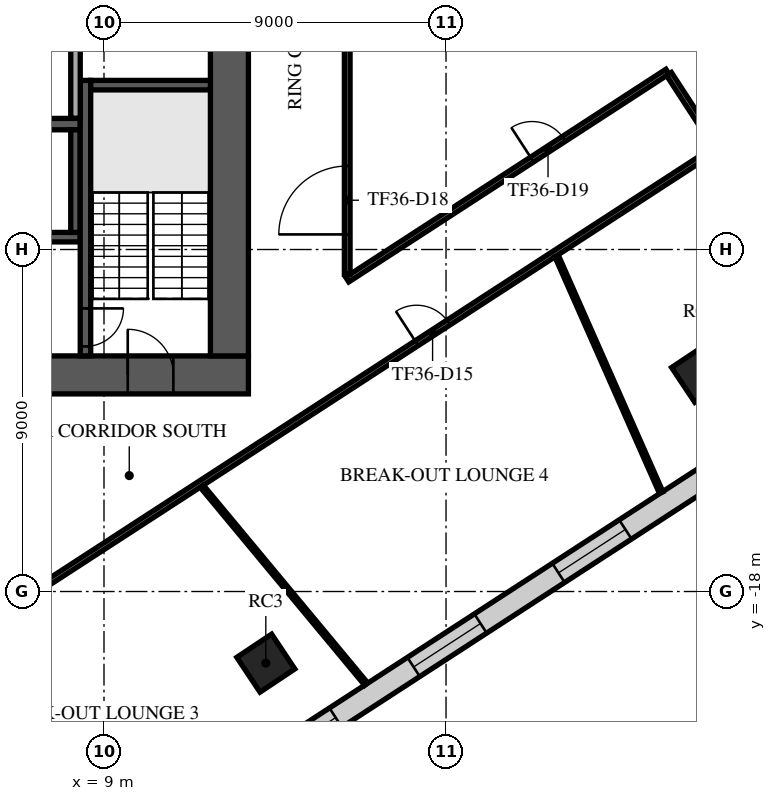
"""IFC4 building model, lengths in metres.
Left out: names, types, materials, properties, quantities, classifications, styles, units other than length and angle.
Written with IfcOpenShell. Run it as: python <this file> out.ifc"""

import sys

from ifc_helpers import new_model, si_unit, direction, frame, frame_2d, origin, origin_2d, place, context, subcontext, project, spatial, rectangle, extrude, element, fill, save


model = new_model("IFC4")
c1 = context("Model", 3, precision=1e-05, world=origin(), true_north=direction((0.0, 1.0)))
c2 = subcontext(c1, "Body", "Model", "MODEL_VIEW")
j1 = project(units=[si_unit("LENGTHUNIT", "METRE"), si_unit("PLANEANGLEUNIT", "RADIAN")], contexts=[c1])
p1 = place(None, origin())
s1 = spatial("IfcSite", under=j1, at=p1, CompositionType="ELEMENT")
p2 = place(p1, origin())
s2 = spatial("IfcBuilding", under=s1, at=p2, CompositionType="ELEMENT")
p3 = place(p2, frame((0.0, 0.0, 155.7)))
s3 = spatial("IfcBuildingStorey", under=s2, at=p3, CompositionType="ELEMENT", Elevation=155.7)
for number, where, z_axis, x_axis in (
    (1, (13.258, -19.885, 0.0), (0.0, 0.0, 1.0), (0.832, 0.555, 0.0)),
    (2, (24.699, -12.258, 0.0), (0.0, 0.0, 1.0), (0.832, 0.555, 0.0)),
):
    element("IfcColumn", number, at=place(p3, frame(where, z_axis=z_axis, x_axis=x_axis)), inside=s3, PredefinedType="COLUMN", context=c2, shape_type="SweptSolid", body=[
        extrude(rectangle(XDim=1.1, YDim=1.1, at=origin_2d()), origin(), (0.0, 0.0, 1.0), 4.0),
    ])
p4 = place(p3, frame((-12.8, -12.3, 0.0), z_axis=(0.0, 0.0, 1.0), x_axis=(1.0, 0.0, 0.0)))
e3 = element("IfcWall", 3, at=p4, inside=s3, PredefinedType="SHEAR", context=c2, shape_type="SweptSolid", body=[
    extrude(rectangle(XDim=25.6, YDim=1.0, at=frame_2d((12.8, 0.0))), origin(), (0.0, 0.0, 1.0), 3.6),
])
p5 = place(p4, frame((7.7, 0.0, 0.0)))
e4 = element("IfcOpeningElement", 4, at=p5, cuts=e3, PredefinedType="OPENING", context=c2, shape_type="SweptSolid", body=[
    extrude(rectangle(XDim=2.0, YDim=2.1, at=frame_2d((1.0, 1.05))), frame((0.0, 0.51, 0.0), z_axis=(0.0, -1.0, 0.0), x_axis=(1.0, 0.0, 0.0)), (0.0, 0.0, 1.0), 1.02),
])
p6 = place(p4, frame((17.825, 0.0, 0.0)))
e5 = element("IfcOpeningElement", 5, at=p6, cuts=e3, PredefinedType="OPENING", context=c2, shape_type="SweptSolid", body=[
    extrude(rectangle(XDim=1.2, YDim=2.1, at=frame_2d((0.6, 1.05))), frame((0.0, 0.51, 0.0), z_axis=(0.0, -1.0, 0.0), x_axis=(1.0, 0.0, 0.0)), (0.0, 0.0, 1.0), 1.02),
])
p7 = place(p4, frame((1.975, 0.0, 0.0)))
e6 = element("IfcOpeningElement", 6, at=p7, cuts=e3, PredefinedType="OPENING", context=c2, shape_type="SweptSolid", body=[
    extrude(rectangle(XDim=1.2, YDim=2.1, at=frame_2d((0.6, 1.05))), frame((0.0, 0.51, 0.0), z_axis=(0.0, -1.0, 0.0), x_axis=(1.0, 0.0, 0.0)), (0.0, 0.0, 1.0), 1.02),
])
p8 = place(p4, frame((22.425, 0.0, 0.0)))
e7 = element("IfcOpeningElement", 7, at=p8, cuts=e3, PredefinedType="OPENING", context=c2, shape_type="SweptSolid", body=[
    extrude(rectangle(XDim=1.2, YDim=2.1, at=frame_2d((0.6, 1.05))), frame((0.0, 0.51, 0.0), z_axis=(0.0, -1.0, 0.0), x_axis=(1.0, 0.0, 0.0)), (0.0, 0.0, 1.0), 1.02),
])
p9 = place(p3, frame((12.3, -11.8, 0.0), z_axis=(0.0, 0.0, 1.0), x_axis=(0.0, 1.0, 0.0)))
e8 = element("IfcWall", 8, at=p9, inside=s3, PredefinedType="SHEAR", context=c2, shape_type="SweptSolid", body=[
    extrude(rectangle(XDim=23.6, YDim=1.0, at=frame_2d((11.8, 0.0))), origin(), (0.0, 0.0, 1.0), 3.6),
])
p10 = place(p9, frame((10.6, 0.0, 0.0)))
e9 = element("IfcOpeningElement", 9, at=p10, cuts=e8, PredefinedType="OPENING", context=c2, shape_type="SweptSolid", body=[
    extrude(rectangle(XDim=2.4, YDim=2.4, at=frame_2d((1.2, 1.2))), frame((0.0, 0.51, 0.0), z_axis=(0.0, -1.0, 0.0), x_axis=(1.0, 0.0, 0.0)), (0.0, 0.0, 1.0), 1.02),
])
p11 = place(p3, frame((-2.875, -5.7, 0.0), z_axis=(0.0, 0.0, 1.0), x_axis=(1.0, 0.0, 0.0)))
e10 = element("IfcWall", 10, at=p11, inside=s3, PredefinedType="SOLIDWALL", context=c2, shape_type="SweptSolid", body=[
    extrude(rectangle(XDim=11.25, YDim=0.3, at=frame_2d((5.625, 0.0))), origin(), (0.0, 0.0, 1.0), 3.6),
])
p12 = place(p3, frame((-2.875, -8.675, 0.0), z_axis=(0.0, 0.0, 1.0), x_axis=(1.0, 0.0, 0.0)))
e11 = element("IfcWall", 11, at=p12, inside=s3, PredefinedType="SOLIDWALL", context=c2, shape_type="SweptSolid", body=[
    extrude(rectangle(XDim=11.25, YDim=0.25, at=frame_2d((5.625, 0.0))), origin(), (0.0, 0.0, 1.0), 3.6),
])
p13 = place(p12, frame((0.9, 0.0, 0.0)))
e12 = element("IfcOpeningElement", 12, at=p13, cuts=e11, PredefinedType="OPENING", context=c2, shape_type="SweptSolid", body=[
    extrude(rectangle(XDim=1.2, YDim=2.1, at=frame_2d((0.6, 1.05))), frame((0.0, 0.135, 0.0), z_axis=(0.0, -1.0, 0.0), x_axis=(1.0, 0.0, 0.0)), (0.0, 0.0, 1.0), 0.27),
])
p14 = place(p12, frame((3.65, 0.0, 0.0)))
e13 = element("IfcOpeningElement", 13, at=p14, cuts=e11, PredefinedType="OPENING", context=c2, shape_type="SweptSolid", body=[
    extrude(rectangle(XDim=1.2, YDim=2.1, at=frame_2d((0.6, 1.05))), frame((0.0, 0.135, 0.0), z_axis=(0.0, -1.0, 0.0), x_axis=(1.0, 0.0, 0.0)), (0.0, 0.0, 1.0), 0.27),
])
p15 = place(p12, frame((6.4, 0.0, 0.0)))
e14 = element("IfcOpeningElement", 14, at=p15, cuts=e11, PredefinedType="OPENING", context=c2, shape_type="SweptSolid", body=[
    extrude(rectangle(XDim=1.2, YDim=2.1, at=frame_2d((0.6, 1.05))), frame((0.0, 0.135, 0.0), z_axis=(0.0, -1.0, 0.0), x_axis=(1.0, 0.0, 0.0)), (0.0, 0.0, 1.0), 0.27),
])
p16 = place(p12, frame((9.15, 0.0, 0.0)))
e15 = element("IfcOpeningElement", 15, at=p16, cuts=e11, PredefinedType="OPENING", context=c2, shape_type="SweptSolid", body=[
    extrude(rectangle(XDim=1.2, YDim=2.1, at=frame_2d((0.6, 1.05))), frame((0.0, 0.135, 0.0), z_axis=(0.0, -1.0, 0.0), x_axis=(1.0, 0.0, 0.0)), (0.0, 0.0, 1.0), 0.27),
])
p17 = place(p3, frame((8.25, -8.55, 0.0), z_axis=(0.0, 0.0, 1.0), x_axis=(0.0, 1.0, 0.0)))
e16 = element("IfcWall", 16, at=p17, inside=s3, PredefinedType="SOLIDWALL", context=c2, shape_type="SweptSolid", body=[
    extrude(rectangle(XDim=2.7, YDim=0.25, at=frame_2d((1.35, 0.0))), origin(), (0.0, 0.0, 1.0), 3.6),
])
p18 = place(p3, frame((8.512, -4.55, 0.0), z_axis=(0.0, 0.0, 1.0), x_axis=(0.0, -1.0, 0.0)))
e17 = element("IfcWall", 17, at=p18, inside=s3, PredefinedType="SOLIDWALL", context=c2, shape_type="SweptSolid", body=[
    extrude(rectangle(XDim=7.25, YDim=0.275, at=frame_2d((3.625, 0.0))), origin(), (0.0, 0.0, 1.0), 3.6),
])
p19 = place(p18, frame((6.0, 0.0, 0.0)))
e18 = element("IfcOpeningElement", 18, at=p19, cuts=e17, PredefinedType="OPENING", context=c2, shape_type="SweptSolid", body=[
    extrude(rectangle(XDim=1.0, YDim=2.1, at=frame_2d((0.5, 1.05))), frame((0.0, 0.147, 0.0), z_axis=(0.0, -1.0, 0.0), x_axis=(1.0, 0.0, 0.0)), (0.0, 0.0, 1.0), 0.295),
])
p20 = place(p3, frame((8.65, -4.675, 0.0), z_axis=(0.0, 0.0, 1.0), x_axis=(1.0, 0.0, 0.0)))
e19 = element("IfcWall", 19, at=p20, inside=s3, PredefinedType="SOLIDWALL", context=c2, shape_type="SweptSolid", body=[
    extrude(rectangle(XDim=3.15, YDim=0.25, at=frame_2d((1.575, 0.0))), origin(), (0.0, 0.0, 1.0), 3.6),
])
p21 = place(p3, frame((8.25, -5.545, 0.0), z_axis=(0.0, 0.0, 1.0), x_axis=(0.0, 1.0, 0.0)))
e20 = element("IfcWall", 20, at=p21, inside=s3, PredefinedType="PARTITIONING", context=c2, shape_type="SweptSolid", body=[
    extrude(rectangle(XDim=2.69, YDim=0.25, at=frame_2d((1.345, 0.0))), origin(), (0.0, 0.0, 1.0), 3.6),
])
p22 = place(p3, frame((-6.647, -35.438, 0.0), z_axis=(0.0, 0.0, 1.0), x_axis=(0.838672034147, 0.544636777257, 0.0)))
e21 = element("IfcWall", 21, at=p22, inside=s3, PredefinedType="STANDARD", context=c2, shape_type="SweptSolid", body=[
    extrude(rectangle(XDim=49.751, YDim=0.6, at=frame_2d((24.876, 0.0))), origin(), (0.0, 0.0, 1.0), 3.6),
])
p23 = place(p22, frame((1.161, 0.0, 0.9)))
e22 = element("IfcOpeningElement", 22, at=p23, cuts=e21, PredefinedType="OPENING", context=c2, shape_type="SweptSolid", body=[
    extrude(rectangle(XDim=2.1, YDim=2.1, at=frame_2d((1.05, 1.05))), frame((0.0, 0.31, 0.0), z_axis=(0.0, -1.0, 0.0), x_axis=(1.0, 0.0, 0.0)), (0.0, 0.0, 1.0), 0.62),
])
p24 = place(p22, frame((5.644, 0.0, 0.9)))
e23 = element("IfcOpeningElement", 23, at=p24, cuts=e21, PredefinedType="OPENING", context=c2, shape_type="SweptSolid", body=[
    extrude(rectangle(XDim=2.1, YDim=2.1, at=frame_2d((1.05, 1.05))), frame((0.0, 0.31, 0.0), z_axis=(0.0, -1.0, 0.0), x_axis=(1.0, 0.0, 0.0)), (0.0, 0.0, 1.0), 0.62),
])
p25 = place(p22, frame((10.189, 0.0, 0.9)))
e24 = element("IfcOpeningElement", 24, at=p25, cuts=e21, PredefinedType="OPENING", context=c2, shape_type="SweptSolid", body=[
    extrude(rectangle(XDim=2.1, YDim=2.1, at=frame_2d((1.05, 1.05))), frame((0.0, 0.31, 0.0), z_axis=(0.0, -1.0, 0.0), x_axis=(1.0, 0.0, 0.0)), (0.0, 0.0, 1.0), 0.62),
])
p26 = place(p22, frame((14.735, 0.0, 0.9)))
e25 = element("IfcOpeningElement", 25, at=p26, cuts=e21, PredefinedType="OPENING", context=c2, shape_type="SweptSolid", body=[
    extrude(rectangle(XDim=2.1, YDim=2.1, at=frame_2d((1.05, 1.05))), frame((0.0, 0.31, 0.0), z_axis=(0.0, -1.0, 0.0), x_axis=(1.0, 0.0, 0.0)), (0.0, 0.0, 1.0), 0.62),
])
p27 = place(p22, frame((19.28, 0.0, 0.9)))
e26 = element("IfcOpeningElement", 26, at=p27, cuts=e21, PredefinedType="OPENING", context=c2, shape_type="SweptSolid", body=[
    extrude(rectangle(XDim=2.1, YDim=2.1, at=frame_2d((1.05, 1.05))), frame((0.0, 0.31, 0.0), z_axis=(0.0, -1.0, 0.0), x_axis=(1.0, 0.0, 0.0)), (0.0, 0.0, 1.0), 0.62),
])
p28 = place(p22, frame((23.826, 0.0, 0.9)))
e27 = element("IfcOpeningElement", 27, at=p28, cuts=e21, PredefinedType="OPENING", context=c2, shape_type="SweptSolid", body=[
    extrude(rectangle(XDim=2.1, YDim=2.1, at=frame_2d((1.05, 1.05))), frame((0.0, 0.31, 0.0), z_axis=(0.0, -1.0, 0.0), x_axis=(1.0, 0.0, 0.0)), (0.0, 0.0, 1.0), 0.62),
])
p29 = place(p22, frame((28.371, 0.0, 0.9)))
e28 = element("IfcOpeningElement", 28, at=p29, cuts=e21, PredefinedType="OPENING", context=c2, shape_type="SweptSolid", body=[
    extrude(rectangle(XDim=2.1, YDim=2.1, at=frame_2d((1.05, 1.05))), frame((0.0, 0.31, 0.0), z_axis=(0.0, -1.0, 0.0), x_axis=(1.0, 0.0, 0.0)), (0.0, 0.0, 1.0), 0.62),
])
p30 = place(p22, frame((32.917, 0.0, 0.9)))
e29 = element("IfcOpeningElement", 29, at=p30, cuts=e21, PredefinedType="OPENING", context=c2, shape_type="SweptSolid", body=[
    extrude(rectangle(XDim=2.1, YDim=2.1, at=frame_2d((1.05, 1.05))), frame((0.0, 0.31, 0.0), z_axis=(0.0, -1.0, 0.0), x_axis=(1.0, 0.0, 0.0)), (0.0, 0.0, 1.0), 0.62),
])
p31 = place(p22, frame((37.462, 0.0, 0.9)))
e30 = element("IfcOpeningElement", 30, at=p31, cuts=e21, PredefinedType="OPENING", context=c2, shape_type="SweptSolid", body=[
    extrude(rectangle(XDim=2.1, YDim=2.1, at=frame_2d((1.05, 1.05))), frame((0.0, 0.31, 0.0), z_axis=(0.0, -1.0, 0.0), x_axis=(1.0, 0.0, 0.0)), (0.0, 0.0, 1.0), 0.62),
])
p32 = place(p22, frame((42.008, 0.0, 0.9)))
e31 = element("IfcOpeningElement", 31, at=p32, cuts=e21, PredefinedType="OPENING", context=c2, shape_type="SweptSolid", body=[
    extrude(rectangle(XDim=2.1, YDim=2.1, at=frame_2d((1.05, 1.05))), frame((0.0, 0.31, 0.0), z_axis=(0.0, -1.0, 0.0), x_axis=(1.0, 0.0, 0.0)), (0.0, 0.0, 1.0), 0.62),
])
p33 = place(p22, frame((46.491, 0.0, 0.9)))
e32 = element("IfcOpeningElement", 32, at=p33, cuts=e21, PredefinedType="OPENING", context=c2, shape_type="SweptSolid", body=[
    extrude(rectangle(XDim=2.1, YDim=2.1, at=frame_2d((1.05, 1.05))), frame((0.0, 0.31, 0.0), z_axis=(0.0, -1.0, 0.0), x_axis=(1.0, 0.0, 0.0)), (0.0, 0.0, 1.0), 0.62),
])
p34 = place(p3, frame((-4.376, -25.496, 0.0), z_axis=(0.0, 0.0, 1.0), x_axis=(0.838659454634, 0.544656147631, 0.0)))
e33 = element("IfcWall", 33, at=p34, inside=s3, PredefinedType="PARTITIONING", context=c2, shape_type="SweptSolid", body=[
    extrude(rectangle(XDim=35.188, YDim=0.15, at=frame_2d((17.594, 0.0))), origin(), (0.0, 0.0, 1.0), 3.15),
])
p35 = place(p34, frame((2.55, 0.0, 0.0)))
e34 = element("IfcOpeningElement", 34, at=p35, cuts=e33, PredefinedType="OPENING", context=c2, shape_type="SweptSolid", body=[
    extrude(rectangle(XDim=1.0, YDim=2.1, at=frame_2d((0.5, 1.05))), frame((0.0, 0.085, 0.0), z_axis=(0.0, -1.0, 0.0), x_axis=(1.0, 0.0, 0.0)), (0.0, 0.0, 1.0), 0.17),
])
p36 = place(p34, frame((12.126, 0.0, 0.0)))
e35 = element("IfcOpeningElement", 35, at=p36, cuts=e33, PredefinedType="OPENING", context=c2, shape_type="SweptSolid", body=[
    extrude(rectangle(XDim=1.0, YDim=2.1, at=frame_2d((0.5, 1.05))), frame((0.0, 0.085, 0.0), z_axis=(0.0, -1.0, 0.0), x_axis=(1.0, 0.0, 0.0)), (0.0, 0.0, 1.0), 0.17),
])
p37 = place(p34, frame((25.759, 0.0, 0.0)))
e36 = element("IfcOpeningElement", 36, at=p37, cuts=e33, PredefinedType="OPENING", context=c2, shape_type="SweptSolid", body=[
    extrude(rectangle(XDim=1.0, YDim=2.1, at=frame_2d((0.5, 1.05))), frame((0.0, 0.085, 0.0), z_axis=(0.0, -1.0, 0.0), x_axis=(1.0, 0.0, 0.0)), (0.0, 0.0, 1.0), 0.17),
])
p38 = place(p3, frame((15.4, -9.791, 0.0), z_axis=(0.0, 0.0, 1.0), x_axis=(0.838699444503, 0.544594566435, 0.0)))
e37 = element("IfcWall", 37, at=p38, inside=s3, PredefinedType="PARTITIONING", context=c2, shape_type="SweptSolid", body=[
    extrude(rectangle(XDim=10.048, YDim=0.15, at=frame_2d((5.024, 0.0))), origin(), (0.0, 0.0, 1.0), 3.15),
])
p39 = place(p38, frame((5.8, 0.0, 0.0)))
e38 = element("IfcOpeningElement", 38, at=p39, cuts=e37, PredefinedType="OPENING", context=c2, shape_type="SweptSolid", body=[
    extrude(rectangle(XDim=1.0, YDim=2.1, at=frame_2d((0.5, 1.05))), frame((0.0, 0.085, 0.0), z_axis=(0.0, -1.0, 0.0), x_axis=(1.0, 0.0, 0.0)), (0.0, 0.0, 1.0), 0.17),
])
p40 = place(p3, frame((15.4, -9.653, 0.0), z_axis=(0.0, 0.0, 1.0), x_axis=(0.0, 1.0, 0.0)))
e39 = element("IfcWall", 39, at=p40, inside=s3, PredefinedType="PARTITIONING", context=c2, shape_type="SweptSolid", body=[
    extrude(rectangle(XDim=15.882, YDim=0.15, at=frame_2d((7.941, 0.0))), origin(), (0.0, 0.0, 1.0), 3.15),
])
p41 = place(p40, frame((1.05, 0.0, 0.0)))
e40 = element("IfcOpeningElement", 40, at=p41, cuts=e39, PredefinedType="OPENING", context=c2, shape_type="SweptSolid", body=[
    extrude(rectangle(XDim=1.8, YDim=2.1, at=frame_2d((0.9, 1.05))), frame((0.0, 0.085, 0.0), z_axis=(0.0, -1.0, 0.0), x_axis=(1.0, 0.0, 0.0)), (0.0, 0.0, 1.0), 0.17),
])
p42 = place(p3, frame((23.868, -4.382, 0.0), z_axis=(0.0, 0.0, 1.0), x_axis=(0.544690717141, -0.838637002916, 0.0)))
e41 = element("IfcWall", 41, at=p42, inside=s3, PredefinedType="PARTITIONING", context=c2, shape_type="SweptSolid", body=[
    extrude(rectangle(XDim=2.249, YDim=0.15, at=frame_2d((1.125, 0.0))), origin(), (0.0, 0.0, 1.0), 3.15),
])
p43 = place(p3, frame((11.576, -15.233, 0.0), z_axis=(0.0, 0.0, 1.0), x_axis=(0.639033492135, -0.769178910222, 0.0)))
e42 = element("IfcWall", 42, at=p43, inside=s3, PredefinedType="PARTITIONING", context=c2, shape_type="SweptSolid", body=[
    extrude(rectangle(XDim=6.764, YDim=0.1, at=frame_2d((3.382, 0.0))), origin(), (0.0, 0.0, 1.0), 2.9),
])
p44 = place(p3, frame((20.911, -9.173, 0.0), z_axis=(0.0, 0.0, 1.0), x_axis=(0.404172925905, -0.914682593015, 0.0)))
e43 = element("IfcWall", 43, at=p44, inside=s3, PredefinedType="PARTITIONING", context=c2, shape_type="SweptSolid", body=[
    extrude(rectangle(XDim=6.803, YDim=0.1, at=frame_2d((3.401, 0.0))), origin(), (0.0, 0.0, 1.0), 2.9),
])
p45 = place(p8, origin())
e44 = element("IfcDoor", 44, at=p45, inside=s3, OperationType="SINGLE_SWING_LEFT", PredefinedType="DOOR", context=c2, shape_type="SweptSolid", body=[
    extrude(rectangle(XDim=1.2, YDim=2.1, at=frame_2d((0.6, 1.05))), frame((0.0, 0.025, 0.0), z_axis=(0.0, -1.0, 0.0), x_axis=(1.0, 0.0, 0.0)), (0.0, 0.0, 1.0), 0.05),
])
fill(e7, e44)
p46 = place(p19, origin())
e45 = element("IfcDoor", 45, at=p46, inside=s3, OperationType="SINGLE_SWING_LEFT", PredefinedType="DOOR", context=c2, shape_type="SweptSolid", body=[
    extrude(rectangle(XDim=1.0, YDim=2.1, at=frame_2d((0.5, 1.05))), frame((0.0, 0.025, 0.0), z_axis=(0.0, -1.0, 0.0), x_axis=(1.0, 0.0, 0.0)), (0.0, 0.0, 1.0), 0.05),
])
fill(e18, e45)
p47 = place(p28, origin())
e46 = element("IfcWindow", 46, at=p47, inside=s3, PartitioningType="SINGLE_PANEL", PredefinedType="WINDOW", context=c2, shape_type="SweptSolid", body=[
    extrude(rectangle(XDim=2.1, YDim=2.1, at=frame_2d((1.05, 1.05))), frame((0.0, 0.03, 0.0), z_axis=(0.0, -1.0, 0.0), x_axis=(1.0, 0.0, 0.0)), (0.0, 0.0, 1.0), 0.06),
])
fill(e27, e46)
p48 = place(p29, origin())
e47 = element("IfcWindow", 47, at=p48, inside=s3, PartitioningType="SINGLE_PANEL", PredefinedType="WINDOW", context=c2, shape_type="SweptSolid", body=[
    extrude(rectangle(XDim=2.1, YDim=2.1, at=frame_2d((1.05, 1.05))), frame((0.0, 0.03, 0.0), z_axis=(0.0, -1.0, 0.0), x_axis=(1.0, 0.0, 0.0)), (0.0, 0.0, 1.0), 0.06),
])
fill(e28, e47)
p49 = place(p30, origin())
e48 = element("IfcWindow", 48, at=p49, inside=s3, PartitioningType="SINGLE_PANEL", PredefinedType="WINDOW", context=c2, shape_type="SweptSolid", body=[
    extrude(rectangle(XDim=2.1, YDim=2.1, at=frame_2d((1.05, 1.05))), frame((0.0, 0.03, 0.0), z_axis=(0.0, -1.0, 0.0), x_axis=(1.0, 0.0, 0.0)), (0.0, 0.0, 1.0), 0.06),
])
fill(e29, e48)
p50 = place(p37, frame((1.0, 0.0, 0.0), z_axis=(0.0, 0.0, 1.0), x_axis=(-1.0, 0.0, 0.0)))
e49 = element("IfcDoor", 49, at=p50, inside=s3, OperationType="SINGLE_SWING_RIGHT", PredefinedType="DOOR", context=c2, shape_type="SweptSolid", body=[
    extrude(rectangle(XDim=1.0, YDim=2.1, at=frame_2d((0.5, 1.05))), frame((0.0, 0.025, 0.0), z_axis=(0.0, -1.0, 0.0), x_axis=(1.0, 0.0, 0.0)), (0.0, 0.0, 1.0), 0.05),
])
fill(e36, e49)
p51 = place(p41, frame((1.8, 0.0, 0.0), z_axis=(0.0, 0.0, 1.0), x_axis=(-1.0, 0.0, 0.0)))
e50 = element("IfcDoor", 50, at=p51, inside=s3, OperationType="DOUBLE_DOOR_SINGLE_SWING", PredefinedType="DOOR", context=c2, shape_type="SweptSolid", body=[
    extrude(rectangle(XDim=1.8, YDim=2.1, at=frame_2d((0.9, 1.05))), frame((0.0, 0.025, 0.0), z_axis=(0.0, -1.0, 0.0), x_axis=(1.0, 0.0, 0.0)), (0.0, 0.0, 1.0), 0.05),
])
fill(e40, e50)
p52 = place(p39, origin())
e51 = element("IfcDoor", 51, at=p52, inside=s3, OperationType="SINGLE_SWING_RIGHT", PredefinedType="DOOR", context=c2, shape_type="SweptSolid", body=[
    extrude(rectangle(XDim=1.0, YDim=2.1, at=frame_2d((0.5, 1.05))), frame((0.0, 0.025, 0.0), z_axis=(0.0, -1.0, 0.0), x_axis=(1.0, 0.0, 0.0)), (0.0, 0.0, 1.0), 0.05),
])
fill(e38, e51)
save(model, sys.argv[1])
